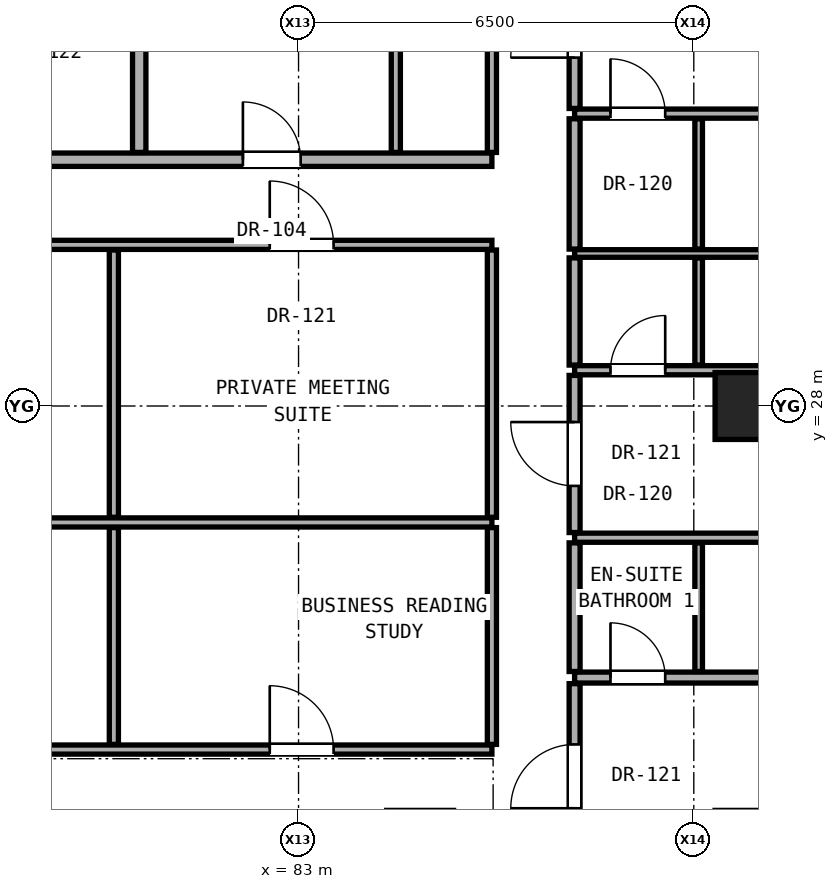
"""IFC4 building model, lengths in metres.
Left out: names, types, materials, properties, quantities, classifications, styles, units other than length and angle.
Written with IfcOpenShell. Run it as: python <this file> out.ifc"""

import sys

from ifc_helpers import new_model, si_unit, direction, frame, frame_2d, origin, origin_2d, place, context, subcontext, project, spatial, rectangle, hollow_rectangle, extrude, element, fill, save


model = new_model("IFC4")
c1 = context("Model", 3, precision=1e-05, world=origin(), true_north=direction((0.0, 1.0)))
c2 = subcontext(c1, "Body", "Model", "MODEL_VIEW")
j1 = project(units=[si_unit("LENGTHUNIT", "METRE"), si_unit("PLANEANGLEUNIT", "RADIAN")], contexts=[c1])
p1 = place(None, origin())
s1 = spatial("IfcSite", under=j1, at=p1, CompositionType="ELEMENT")
p2 = place(p1, origin())
s2 = spatial("IfcBuilding", under=s1, at=p2, CompositionType="ELEMENT")
p3 = place(p2, frame((0.0, 0.0, 144.5)))
s3 = spatial("IfcBuildingStorey", under=s2, at=p3, CompositionType="ELEMENT", Elevation=144.5)
p4 = place(p3, frame((90.4, 28.0, 0.0), z_axis=(0.0, 0.0, 1.0), x_axis=(1.0, 0.0, 0.0)))
e1 = element("IfcColumn", 1, at=p4, inside=s3, PredefinedType="COLUMN", context=c2, shape_type="SweptSolid", body=[
    extrude(hollow_rectangle(XDim=1.1, YDim=1.1, WallThickness=0.06, at=origin_2d()), origin(), (0.0, 0.0, 1.0), 3.3),
])
p5 = place(p3, frame((66.68, 22.35, 0.0), z_axis=(0.0, 0.0, 1.0), x_axis=(1.0, 0.0, 0.0)))
e2 = element("IfcWall", 2, at=p5, inside=s3, PredefinedType="PARTITIONING", context=c2, shape_type="SweptSolid", body=[
    extrude(rectangle(XDim=19.5, YDim=0.15, at=frame_2d((9.75, 0.0))), origin(), (0.0, 0.0, 1.0), 2.316),
])
p6 = place(p5, frame((8.802, 0.0, 0.0)))
e3 = element("IfcOpeningElement", 3, at=p6, cuts=e2, PredefinedType="OPENING", context=c2, shape_type="SweptSolid", body=[
    extrude(rectangle(XDim=1.05, YDim=2.2, at=frame_2d((0.525, 1.1))), frame((0.0, 0.085, 0.0), z_axis=(0.0, -1.0, 0.0), x_axis=(1.0, 0.0, 0.0)), (0.0, 0.0, 1.0), 0.17),
])
p7 = place(p5, frame((15.846, 0.0, 0.0)))
e4 = element("IfcOpeningElement", 4, at=p7, cuts=e2, PredefinedType="OPENING", context=c2, shape_type="SweptSolid", body=[
    extrude(rectangle(XDim=1.05, YDim=2.2, at=frame_2d((0.525, 1.1))), frame((0.0, 0.085, 0.0), z_axis=(0.0, -1.0, 0.0), x_axis=(1.0, 0.0, 0.0)), (0.0, 0.0, 1.0), 0.17),
])
p8 = place(p3, frame((87.54, 23.534, 0.0), z_axis=(0.0, 0.0, 1.0), x_axis=(1.0, 0.0, 0.0)))
e5 = element("IfcWall", 5, at=p8, inside=s3, PredefinedType="PARTITIONING", context=c2, shape_type="SweptSolid", body=[
    extrude(rectangle(XDim=7.709, YDim=0.18, at=frame_2d((3.854, 0.0))), origin(), (0.0, 0.0, 1.0), 2.159),
])
p9 = place(p8, frame((4.429, 0.0, 0.0)))
e6 = element("IfcOpeningElement", 6, at=p9, cuts=e5, PredefinedType="OPENING", context=c2, shape_type="SweptSolid", body=[
    extrude(rectangle(XDim=0.85, YDim=2.01, at=frame_2d((0.425, 1.005))), frame((0.0, 0.1, 0.0), z_axis=(0.0, -1.0, 0.0), x_axis=(1.0, 0.0, 0.0)), (0.0, 0.0, 1.0), 0.2),
])
p10 = place(p8, frame((0.59, 0.0, 0.0)))
e7 = element("IfcOpeningElement", 7, at=p10, cuts=e5, PredefinedType="OPENING", context=c2, shape_type="SweptSolid", body=[
    extrude(rectangle(XDim=0.9, YDim=2.1, at=frame_2d((0.45, 1.05))), frame((0.0, 0.1, 0.0), z_axis=(0.0, -1.0, 0.0), x_axis=(1.0, 0.0, 0.0)), (0.0, 0.0, 1.0), 0.2),
])
p11 = place(p3, frame((87.54, 25.834, 0.0), z_axis=(0.0, 0.0, 1.0), x_axis=(1.0, 0.0, 0.0)))
e8 = element("IfcWall", 8, at=p11, inside=s3, PredefinedType="PARTITIONING", context=c2, shape_type="SweptSolid", body=[
    extrude(rectangle(XDim=7.709, YDim=0.15, at=frame_2d((3.854, 0.0))), origin(), (0.0, 0.0, 1.0), 2.159),
])
p12 = place(p3, frame((72.05, 26.085, 0.0), z_axis=(0.0, 0.0, 1.0), x_axis=(1.0, 0.0, 0.0)))
e9 = element("IfcWall", 9, at=p12, inside=s3, PredefinedType="PARTITIONING", context=c2, shape_type="SweptSolid", body=[
    extrude(rectangle(XDim=14.13, YDim=0.15, at=frame_2d((7.065, 0.0))), origin(), (0.0, 0.0, 1.0), 2.316),
])
p13 = place(p3, frame((87.54, 28.588, 0.0), z_axis=(0.0, 0.0, 1.0), x_axis=(1.0, 0.0, 0.0)))
e10 = element("IfcWall", 10, at=p13, inside=s3, PredefinedType="PARTITIONING", context=c2, shape_type="SweptSolid", body=[
    extrude(rectangle(XDim=7.709, YDim=0.15, at=frame_2d((3.854, 0.0))), origin(), (0.0, 0.0, 1.0), 2.159),
])
p14 = place(p13, frame((4.429, 0.0, 0.0)))
e11 = element("IfcOpeningElement", 11, at=p14, cuts=e10, PredefinedType="OPENING", context=c2, shape_type="SweptSolid", body=[
    extrude(rectangle(XDim=0.85, YDim=2.01, at=frame_2d((0.425, 1.005))), frame((0.0, 0.085, 0.0), z_axis=(0.0, -1.0, 0.0), x_axis=(1.0, 0.0, 0.0)), (0.0, 0.0, 1.0), 0.17),
])
p15 = place(p13, frame((0.59, 0.0, 0.0)))
e12 = element("IfcOpeningElement", 12, at=p15, cuts=e10, PredefinedType="OPENING", context=c2, shape_type="SweptSolid", body=[
    extrude(rectangle(XDim=0.9, YDim=2.1, at=frame_2d((0.45, 1.05))), frame((0.0, 0.085, 0.0), z_axis=(0.0, -1.0, 0.0), x_axis=(1.0, 0.0, 0.0)), (0.0, 0.0, 1.0), 0.17),
])
p16 = place(p3, frame((66.68, 30.65, 0.0), z_axis=(0.0, 0.0, 1.0), x_axis=(1.0, 0.0, 0.0)))
e13 = element("IfcWall", 13, at=p16, inside=s3, PredefinedType="PARTITIONING", context=c2, shape_type="SweptSolid", body=[
    extrude(rectangle(XDim=19.5, YDim=0.15, at=frame_2d((9.75, 0.0))), origin(), (0.0, 0.0, 1.0), 2.316),
])
p17 = place(p16, frame((3.745, 0.0, 0.0)))
e14 = element("IfcOpeningElement", 14, at=p17, cuts=e13, PredefinedType="OPENING", context=c2, shape_type="SweptSolid", body=[
    extrude(rectangle(XDim=0.95, YDim=2.15, at=frame_2d((0.475, 1.075))), frame((0.0, 0.085, 0.0), z_axis=(0.0, -1.0, 0.0), x_axis=(1.0, 0.0, 0.0)), (0.0, 0.0, 1.0), 0.17),
])
p18 = place(p16, frame((8.802, 0.0, 0.0)))
e15 = element("IfcOpeningElement", 15, at=p18, cuts=e13, PredefinedType="OPENING", context=c2, shape_type="SweptSolid", body=[
    extrude(rectangle(XDim=1.05, YDim=2.2, at=frame_2d((0.525, 1.1))), frame((0.0, 0.085, 0.0), z_axis=(0.0, -1.0, 0.0), x_axis=(1.0, 0.0, 0.0)), (0.0, 0.0, 1.0), 0.17),
])
p19 = place(p16, frame((15.846, 0.0, 0.0)))
e16 = element("IfcOpeningElement", 16, at=p19, cuts=e13, PredefinedType="OPENING", context=c2, shape_type="SweptSolid", body=[
    extrude(rectangle(XDim=1.05, YDim=2.2, at=frame_2d((0.525, 1.1))), frame((0.0, 0.085, 0.0), z_axis=(0.0, -1.0, 0.0), x_axis=(1.0, 0.0, 0.0)), (0.0, 0.0, 1.0), 0.17),
])
p20 = place(p3, frame((87.54, 30.508, 0.0), z_axis=(0.0, 0.0, 1.0), x_axis=(1.0, 0.0, 0.0)))
e17 = element("IfcWall", 17, at=p20, inside=s3, PredefinedType="PARTITIONING", context=c2, shape_type="SweptSolid", body=[
    extrude(rectangle(XDim=7.709, YDim=0.125, at=frame_2d((3.854, 0.0))), origin(), (0.0, 0.0, 1.0), 2.159),
])
p21 = place(p3, frame((71.55, 32.05, 0.0), z_axis=(0.0, 0.0, 1.0), x_axis=(1.0, 0.0, 0.0)))
e18 = element("IfcWall", 18, at=p21, inside=s3, PredefinedType="SOLIDWALL", context=c2, shape_type="SweptSolid", body=[
    extrude(rectangle(XDim=14.63, YDim=0.22, at=frame_2d((7.315, 0.0))), origin(), (0.0, 0.0, 1.0), 2.316),
])
p22 = place(p21, frame((5.89, 0.0, 0.0)))
e19 = element("IfcOpeningElement", 19, at=p22, cuts=e18, PredefinedType="OPENING", context=c2, shape_type="SweptSolid", body=[
    extrude(rectangle(XDim=1.2, YDim=2.25, at=frame_2d((0.6, 1.125))), frame((0.0, 0.12, 0.0), z_axis=(0.0, -1.0, 0.0), x_axis=(1.0, 0.0, 0.0)), (0.0, 0.0, 1.0), 0.24),
])
p23 = place(p21, frame((10.535, 0.0, 0.0)))
e20 = element("IfcOpeningElement", 20, at=p23, cuts=e18, PredefinedType="OPENING", context=c2, shape_type="SweptSolid", body=[
    extrude(rectangle(XDim=0.95, YDim=2.15, at=frame_2d((0.475, 1.075))), frame((0.0, 0.12, 0.0), z_axis=(0.0, -1.0, 0.0), x_axis=(1.0, 0.0, 0.0)), (0.0, 0.0, 1.0), 0.24),
])
p24 = place(p21, frame((0.7, 0.0, 0.0)))
e21 = element("IfcOpeningElement", 21, at=p24, cuts=e18, PredefinedType="OPENING", context=c2, shape_type="SweptSolid", body=[
    extrude(rectangle(XDim=0.85, YDim=2.01, at=frame_2d((0.425, 1.005))), frame((0.0, 0.12, 0.0), z_axis=(0.0, -1.0, 0.0), x_axis=(1.0, 0.0, 0.0)), (0.0, 0.0, 1.0), 0.24),
])
p25 = place(p21, frame((2.55, 0.0, 0.0)))
e22 = element("IfcOpeningElement", 22, at=p25, cuts=e18, PredefinedType="OPENING", context=c2, shape_type="SweptSolid", body=[
    extrude(rectangle(XDim=0.85, YDim=2.01, at=frame_2d((0.425, 1.005))), frame((0.0, 0.12, 0.0), z_axis=(0.0, -1.0, 0.0), x_axis=(1.0, 0.0, 0.0)), (0.0, 0.0, 1.0), 0.24),
])
p26 = place(p3, frame((87.54, 32.808, 0.0), z_axis=(0.0, 0.0, 1.0), x_axis=(1.0, 0.0, 0.0)))
e23 = element("IfcWall", 23, at=p26, inside=s3, PredefinedType="PARTITIONING", context=c2, shape_type="SweptSolid", body=[
    extrude(rectangle(XDim=7.709, YDim=0.15, at=frame_2d((3.854, 0.0))), origin(), (0.0, 0.0, 1.0), 2.159),
])
p27 = place(p26, frame((4.429, 0.0, 0.0)))
e24 = element("IfcOpeningElement", 24, at=p27, cuts=e23, PredefinedType="OPENING", context=c2, shape_type="SweptSolid", body=[
    extrude(rectangle(XDim=0.85, YDim=2.01, at=frame_2d((0.425, 1.005))), frame((0.0, 0.085, 0.0), z_axis=(0.0, -1.0, 0.0), x_axis=(1.0, 0.0, 0.0)), (0.0, 0.0, 1.0), 0.17),
])
p28 = place(p26, frame((0.59, 0.0, 0.0)))
e25 = element("IfcOpeningElement", 25, at=p28, cuts=e23, PredefinedType="OPENING", context=c2, shape_type="SweptSolid", body=[
    extrude(rectangle(XDim=0.9, YDim=2.1, at=frame_2d((0.45, 1.05))), frame((0.0, 0.085, 0.0), z_axis=(0.0, -1.0, 0.0), x_axis=(1.0, 0.0, 0.0)), (0.0, 0.0, 1.0), 0.17),
])
p29 = place(p3, frame((79.963, 22.435, 0.0), z_axis=(0.0, 0.0, 1.0), x_axis=(0.0, 1.0, 0.0)))
e26 = element("IfcWall", 26, at=p29, inside=s3, PredefinedType="PARTITIONING", context=c2, shape_type="SweptSolid", body=[
    extrude(rectangle(XDim=3.565, YDim=0.15, at=frame_2d((1.782, 0.0))), origin(), (0.0, 0.0, 1.0), 2.94),
])
p30 = place(p3, frame((79.963, 26.17, 0.0), z_axis=(0.0, 0.0, 1.0), x_axis=(0.0, 1.0, 0.0)))
e27 = element("IfcWall", 27, at=p30, inside=s3, PredefinedType="PARTITIONING", context=c2, shape_type="SweptSolid", body=[
    extrude(rectangle(XDim=4.395, YDim=0.15, at=frame_2d((2.198, 0.0))), origin(), (0.0, 0.0, 1.0), 2.316),
])
p31 = place(p3, frame((80.38, 32.17, 0.0), z_axis=(0.0, 0.0, 1.0), x_axis=(0.0, 1.0, 0.0)))
e28 = element("IfcWall", 28, at=p31, inside=s3, PredefinedType="SOLIDWALL", context=c2, shape_type="SweptSolid", body=[
    extrude(rectangle(XDim=2.76, YDim=0.22, at=frame_2d((1.38, 0.0))), origin(), (0.0, 0.0, 1.0), 2.94),
])
p32 = place(p3, frame((84.6, 32.17, 0.0), z_axis=(0.0, 0.0, 1.0), x_axis=(0.0, 1.0, 0.0)))
e29 = element("IfcWall", 29, at=p32, inside=s3, PredefinedType="PARTITIONING", context=c2, shape_type="SweptSolid", body=[
    extrude(rectangle(XDim=2.76, YDim=0.15, at=frame_2d((1.38, 0.0))), origin(), (0.0, 0.0, 1.0), 2.94),
])
p33 = place(p3, frame((86.18, 22.435, 0.0), z_axis=(0.0, 0.0, 1.0), x_axis=(0.0, 1.0, 0.0)))
e30 = element("IfcWall", 30, at=p33, inside=s3, PredefinedType="PARTITIONING", context=c2, shape_type="SweptSolid", body=[
    extrude(rectangle(XDim=3.565, YDim=0.15, at=frame_2d((1.782, 0.0))), origin(), (0.0, 0.0, 1.0), 2.94),
])
p34 = place(p3, frame((86.18, 26.17, 0.0), z_axis=(0.0, 0.0, 1.0), x_axis=(0.0, 1.0, 0.0)))
e31 = element("IfcWall", 31, at=p34, inside=s3, PredefinedType="PARTITIONING", context=c2, shape_type="SweptSolid", body=[
    extrude(rectangle(XDim=4.395, YDim=0.15, at=frame_2d((2.198, 0.0))), origin(), (0.0, 0.0, 1.0), 2.316),
])
p35 = place(p3, frame((86.18, 32.17, 0.0), z_axis=(0.0, 0.0, 1.0), x_axis=(0.0, 1.0, 0.0)))
e32 = element("IfcWall", 32, at=p35, inside=s3, PredefinedType="PARTITIONING", context=c2, shape_type="SweptSolid", body=[
    extrude(rectangle(XDim=3.445, YDim=0.15, at=frame_2d((1.723, 0.0))), origin(), (0.0, 0.0, 1.0), 2.332),
])
p36 = place(p3, frame((87.54, 20.385, 0.0), z_axis=(0.0, 0.0, 1.0), x_axis=(0.0, 1.0, 0.0)))
e33 = element("IfcWall", 33, at=p36, inside=s3, PredefinedType="PARTITIONING", context=c2, shape_type="SweptSolid", body=[
    extrude(rectangle(XDim=3.049, YDim=0.18, at=frame_2d((1.524, 0.0))), origin(), (0.0, 0.0, 1.0), 2.332),
])
p37 = place(p36, frame((1.0, 0.0, 0.0)))
e34 = element("IfcOpeningElement", 34, at=p37, cuts=e33, PredefinedType="OPENING", context=c2, shape_type="SweptSolid", body=[
    extrude(rectangle(XDim=1.05, YDim=2.2, at=frame_2d((0.525, 1.1))), frame((0.0, 0.1, 0.0), z_axis=(0.0, -1.0, 0.0), x_axis=(1.0, 0.0, 0.0)), (0.0, 0.0, 1.0), 0.2),
])
p38 = place(p3, frame((87.54, 23.634, 0.0), z_axis=(0.0, 0.0, 1.0), x_axis=(0.0, 1.0, 0.0)))
e35 = element("IfcWall", 35, at=p38, inside=s3, PredefinedType="PARTITIONING", context=c2, shape_type="SweptSolid", body=[
    extrude(rectangle(XDim=2.115, YDim=0.18, at=frame_2d((1.058, 0.0))), origin(), (0.0, 0.0, 1.0), 2.94),
])
p39 = place(p3, frame((87.54, 25.919, 0.0), z_axis=(0.0, 0.0, 1.0), x_axis=(0.0, 1.0, 0.0)))
e36 = element("IfcWall", 36, at=p39, inside=s3, PredefinedType="PARTITIONING", context=c2, shape_type="SweptSolid", body=[
    extrude(rectangle(XDim=2.584, YDim=0.18, at=frame_2d((1.292, 0.0))), origin(), (0.0, 0.0, 1.0), 2.316),
])
p40 = place(p39, frame((0.767, 0.0, 0.0)))
e37 = element("IfcOpeningElement", 37, at=p40, cuts=e36, PredefinedType="OPENING", context=c2, shape_type="SweptSolid", body=[
    extrude(rectangle(XDim=1.05, YDim=2.2, at=frame_2d((0.525, 1.1))), frame((0.0, 0.1, 0.0), z_axis=(0.0, -1.0, 0.0), x_axis=(1.0, 0.0, 0.0)), (0.0, 0.0, 1.0), 0.2),
])
p41 = place(p3, frame((87.54, 28.673, 0.0), z_axis=(0.0, 0.0, 1.0), x_axis=(0.0, 1.0, 0.0)))
e38 = element("IfcWall", 38, at=p41, inside=s3, PredefinedType="PARTITIONING", context=c2, shape_type="SweptSolid", body=[
    extrude(rectangle(XDim=1.762, YDim=0.18, at=frame_2d((0.881, 0.0))), origin(), (0.0, 0.0, 1.0), 2.94),
])
p42 = place(p3, frame((87.54, 30.581, 0.0), z_axis=(0.0, 0.0, 1.0), x_axis=(0.0, 1.0, 0.0)))
e39 = element("IfcWall", 39, at=p42, inside=s3, PredefinedType="PARTITIONING", context=c2, shape_type="SweptSolid", body=[
    extrude(rectangle(XDim=2.142, YDim=0.18, at=frame_2d((1.071, 0.0))), origin(), (0.0, 0.0, 1.0), 2.94),
])
p43 = place(p3, frame((87.54, 32.893, 0.0), z_axis=(0.0, 0.0, 1.0), x_axis=(0.0, 1.0, 0.0)))
e40 = element("IfcWall", 40, at=p43, inside=s3, PredefinedType="PARTITIONING", context=c2, shape_type="SweptSolid", body=[
    extrude(rectangle(XDim=2.722, YDim=0.18, at=frame_2d((1.361, 0.0))), origin(), (0.0, 0.0, 1.0), 2.332),
])
p44 = place(p43, frame((0.836, 0.0, 0.0)))
e41 = element("IfcOpeningElement", 41, at=p44, cuts=e40, PredefinedType="OPENING", context=c2, shape_type="SweptSolid", body=[
    extrude(rectangle(XDim=1.05, YDim=2.2, at=frame_2d((0.525, 1.1))), frame((0.0, 0.1, 0.0), z_axis=(0.0, -1.0, 0.0), x_axis=(1.0, 0.0, 0.0)), (0.0, 0.0, 1.0), 0.2),
])
p45 = place(p3, frame((89.58, 23.634, 0.0), z_axis=(0.0, 0.0, 1.0), x_axis=(0.0, 1.0, 0.0)))
e42 = element("IfcWall", 42, at=p45, inside=s3, PredefinedType="PARTITIONING", context=c2, shape_type="SweptSolid", body=[
    extrude(rectangle(XDim=2.115, YDim=0.125, at=frame_2d((1.058, 0.0))), origin(), (0.0, 0.0, 1.0), 2.94),
])
p46 = place(p3, frame((89.58, 28.673, 0.0), z_axis=(0.0, 0.0, 1.0), x_axis=(0.0, 1.0, 0.0)))
e43 = element("IfcWall", 43, at=p46, inside=s3, PredefinedType="PARTITIONING", context=c2, shape_type="SweptSolid", body=[
    extrude(rectangle(XDim=1.762, YDim=0.125, at=frame_2d((0.881, 0.0))), origin(), (0.0, 0.0, 1.0), 2.94),
])
p47 = place(p3, frame((89.58, 30.581, 0.0), z_axis=(0.0, 0.0, 1.0), x_axis=(0.0, 1.0, 0.0)))
e44 = element("IfcWall", 44, at=p47, inside=s3, PredefinedType="PARTITIONING", context=c2, shape_type="SweptSolid", body=[
    extrude(rectangle(XDim=2.142, YDim=0.125, at=frame_2d((1.071, 0.0))), origin(), (0.0, 0.0, 1.0), 2.94),
])
p48 = place(p23, origin())
e45 = element("IfcDoor", 45, at=p48, inside=s3, OperationType="SINGLE_SWING_LEFT", PredefinedType="DOOR", context=c2, shape_type="SweptSolid", body=[
    extrude(rectangle(XDim=0.95, YDim=2.15, at=frame_2d((0.475, 1.075))), frame((0.0, 0.025, 0.0), z_axis=(0.0, -1.0, 0.0), x_axis=(1.0, 0.0, 0.0)), (0.0, 0.0, 1.0), 0.05),
])
fill(e20, e45)
p49 = place(p37, origin())
e46 = element("IfcDoor", 46, at=p49, inside=s3, OperationType="SINGLE_SWING_LEFT", PredefinedType="DOOR", context=c2, shape_type="SweptSolid", body=[
    extrude(rectangle(XDim=1.05, YDim=2.2, at=frame_2d((0.525, 1.1))), frame((0.0, 0.025, 0.0), z_axis=(0.0, -1.0, 0.0), x_axis=(1.0, 0.0, 0.0)), (0.0, 0.0, 1.0), 0.05),
])
fill(e34, e46)
p50 = place(p10, origin())
e47 = element("IfcDoor", 47, at=p50, inside=s3, OperationType="SINGLE_SWING_LEFT", PredefinedType="DOOR", context=c2, shape_type="SweptSolid", body=[
    extrude(rectangle(XDim=0.9, YDim=2.1, at=frame_2d((0.45, 1.05))), frame((0.0, 0.025, 0.0), z_axis=(0.0, -1.0, 0.0), x_axis=(1.0, 0.0, 0.0)), (0.0, 0.0, 1.0), 0.05),
])
fill(e7, e47)
p51 = place(p40, origin())
e48 = element("IfcDoor", 48, at=p51, inside=s3, OperationType="SINGLE_SWING_RIGHT", PredefinedType="DOOR", context=c2, shape_type="SweptSolid", body=[
    extrude(rectangle(XDim=1.05, YDim=2.2, at=frame_2d((0.525, 1.1))), frame((0.0, 0.025, 0.0), z_axis=(0.0, -1.0, 0.0), x_axis=(1.0, 0.0, 0.0)), (0.0, 0.0, 1.0), 0.05),
])
fill(e37, e48)
p52 = place(p15, origin())
e49 = element("IfcDoor", 49, at=p52, inside=s3, OperationType="SINGLE_SWING_RIGHT", PredefinedType="DOOR", context=c2, shape_type="SweptSolid", body=[
    extrude(rectangle(XDim=0.9, YDim=2.1, at=frame_2d((0.45, 1.05))), frame((0.0, 0.025, 0.0), z_axis=(0.0, -1.0, 0.0), x_axis=(1.0, 0.0, 0.0)), (0.0, 0.0, 1.0), 0.05),
])
fill(e12, e49)
p53 = place(p44, origin())
e50 = element("IfcDoor", 50, at=p53, inside=s3, OperationType="SINGLE_SWING_LEFT", PredefinedType="DOOR", context=c2, shape_type="SweptSolid", body=[
    extrude(rectangle(XDim=1.05, YDim=2.2, at=frame_2d((0.525, 1.1))), frame((0.0, 0.025, 0.0), z_axis=(0.0, -1.0, 0.0), x_axis=(1.0, 0.0, 0.0)), (0.0, 0.0, 1.0), 0.05),
])
fill(e41, e50)
p54 = place(p28, origin())
e51 = element("IfcDoor", 51, at=p54, inside=s3, OperationType="SINGLE_SWING_LEFT", PredefinedType="DOOR", context=c2, shape_type="SweptSolid", body=[
    extrude(rectangle(XDim=0.9, YDim=2.1, at=frame_2d((0.45, 1.05))), frame((0.0, 0.025, 0.0), z_axis=(0.0, -1.0, 0.0), x_axis=(1.0, 0.0, 0.0)), (0.0, 0.0, 1.0), 0.05),
])
fill(e25, e51)
p55 = place(p7, origin())
e52 = element("IfcDoor", 52, at=p55, inside=s3, OperationType="SINGLE_SWING_LEFT", PredefinedType="DOOR", context=c2, shape_type="SweptSolid", body=[
    extrude(rectangle(XDim=1.05, YDim=2.2, at=frame_2d((0.525, 1.1))), frame((0.0, 0.025, 0.0), z_axis=(0.0, -1.0, 0.0), x_axis=(1.0, 0.0, 0.0)), (0.0, 0.0, 1.0), 0.05),
])
fill(e4, e52)
p56 = place(p19, origin())
e53 = element("IfcDoor", 53, at=p56, inside=s3, OperationType="SINGLE_SWING_LEFT", PredefinedType="DOOR", context=c2, shape_type="SweptSolid", body=[
    extrude(rectangle(XDim=1.05, YDim=2.2, at=frame_2d((0.525, 1.1))), frame((0.0, 0.025, 0.0), z_axis=(0.0, -1.0, 0.0), x_axis=(1.0, 0.0, 0.0)), (0.0, 0.0, 1.0), 0.05),
])
fill(e16, e53)
save(model, sys.argv[1])
